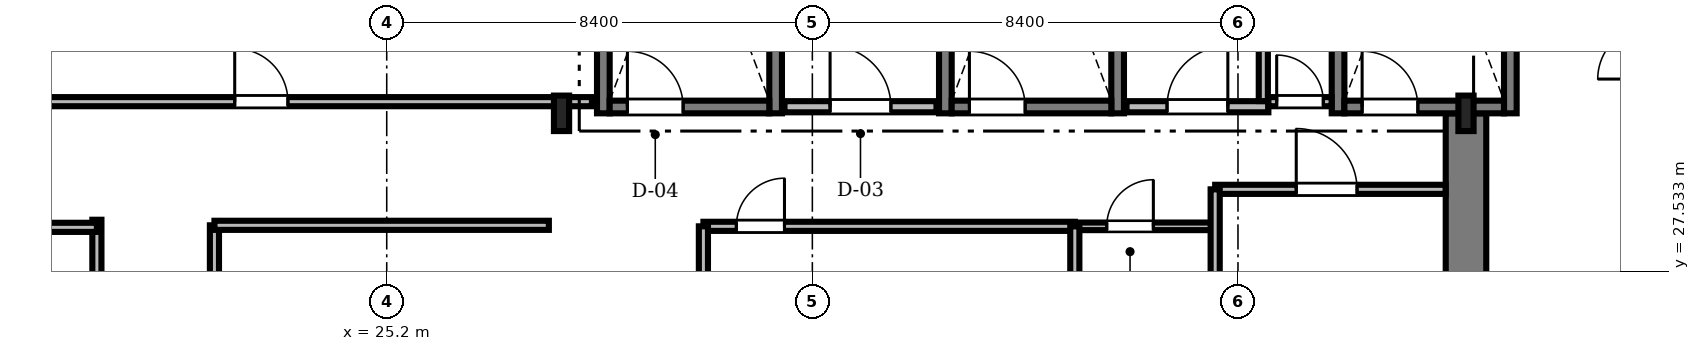
"""IFC4 building model, lengths in metres.
Left out: names, types, materials, properties, quantities, classifications, styles, units other than length and angle.
Written with IfcOpenShell. Run it as: python <this file> out.ifc"""

import sys

from ifc_helpers import new_model, si_unit, direction, frame, frame_2d, origin, origin_2d, place, context, subcontext, project, spatial, rectangle, i_section, extrude, source, transform, mapped, element, fill, save


model = new_model("IFC4")
c1 = context("Model", 3, precision=1e-05, world=origin(), true_north=direction((0.0, 1.0)))
c2 = subcontext(c1, "Body", "Model", "MODEL_VIEW")
j1 = project(units=[si_unit("LENGTHUNIT", "METRE"), si_unit("PLANEANGLEUNIT", "RADIAN")], contexts=[c1])
p1 = place(None, origin())
s1 = spatial("IfcSite", under=j1, at=p1, CompositionType="ELEMENT")
p2 = place(p1, origin())
s2 = spatial("IfcBuilding", under=s1, at=p2, CompositionType="ELEMENT")
p3 = place(p2, frame((0.0, 0.0, 199.8)))
s3 = spatial("IfcBuildingStorey", under=s2, at=p3, CompositionType="ELEMENT", Elevation=199.8)
m1 = source(origin(), c2, "Body", "SweptSolid", [
    extrude(rectangle(XDim=13.15, YDim=0.8, at=frame_2d((6.575, 0.0))), origin(), (0.0, 0.0, 1.0), 3.53),
])
p4 = place(p3, frame((46.5, 17.5, 0.0), z_axis=(0.0, 0.0, 1.0), x_axis=(0.0, 1.0, 0.0)))
e1 = element("IfcWall", 1, at=p4, inside=s3, PredefinedType="SHEAR", context=c2, shape_type="MappedRepresentation", body=[
    mapped(m1, transform((0.0, 0.0, 0.0), scale=1.0)),
])
m2 = source(origin(), c2, "Body", "SweptSolid", [
    extrude(i_section(OverallWidth=0.3, OverallDepth=0.7, WebThickness=0.017, FlangeThickness=0.032, FilletRadius=0.027, at=origin_2d()), origin(), (0.0, 0.0, 1.0), 3.53),
])
for number, where, z_axis, x_axis in (
    (2, (28.65, 30.65, 0.0), (0.0, 0.0, 1.0), (1.0, 0.0, 0.0)),
    (3, (46.5, 30.65, 0.0), (0.0, 0.0, 1.0), (1.0, 0.0, 0.0)),
):
    element("IfcColumn", number, at=place(p3, frame(where, z_axis=z_axis, x_axis=x_axis)), inside=s3, PredefinedType="COLUMN", context=c2, shape_type="MappedRepresentation", body=[
        mapped(m2, transform((0.0, 0.0, 0.0), scale=1.0)),
    ])
m3 = source(origin(), c2, "Body", "SweptSolid", [
    extrude(rectangle(XDim=9.25, YDim=0.25, at=frame_2d((4.625, 0.0))), origin(), (0.0, 0.0, 1.0), 3.55),
])
for number, where, z_axis, x_axis in (
    (4, (29.475, 30.65, 0.0), (0.0, 0.0, 1.0), (0.0, 1.0, 0.0)),
    (5, (32.875, 30.65, 0.0), (0.0, 0.0, 1.0), (0.0, 1.0, 0.0)),
):
    element("IfcWall", number, at=place(p3, frame(where, z_axis=z_axis, x_axis=x_axis)), inside=s3, PredefinedType="SOLIDWALL", context=c2, shape_type="MappedRepresentation", body=[
        mapped(m3, transform((0.0, 0.0, 0.0), scale=1.0)),
    ])
m4 = source(origin(), c2, "Body", "SweptSolid", [
    extrude(rectangle(XDim=3.15, YDim=0.25, at=frame_2d((1.575, 0.0))), origin(), (0.0, 0.0, 1.0), 3.55),
])
p5 = place(p3, frame((29.6, 30.775, 0.0), z_axis=(0.0, 0.0, 1.0), x_axis=(1.0, 0.0, 0.0)))
e6 = element("IfcWall", 6, at=p5, inside=s3, PredefinedType="SOLIDWALL", context=c2, shape_type="MappedRepresentation", body=[
    mapped(m4, transform((0.0, 0.0, 0.0), scale=1.0)),
])
m5 = source(origin(), c2, "Body", "SweptSolid", [
    extrude(rectangle(XDim=1.1, YDim=2.2, at=frame_2d((0.55, 1.1))), frame((0.0, 0.135, 0.0), z_axis=(0.0, -1.0, 0.0), x_axis=(1.0, 0.0, 0.0)), (0.0, 0.0, 1.0), 0.27),
])
p6 = place(p5, frame((0.35, 0.0, 0.0)))
e7 = element("IfcOpeningElement", 7, at=p6, cuts=e6, PredefinedType="OPENING", context=c2, shape_type="MappedRepresentation", body=[
    mapped(m5, transform((0.0, 0.0, 0.0), scale=1.0)),
])
for number, where, z_axis, x_axis in (
    (8, (36.225, 30.65, 0.0), (0.0, 0.0, 1.0), (0.0, 1.0, 0.0)),
    (9, (39.625, 30.65, 0.0), (0.0, 0.0, 1.0), (0.0, 1.0, 0.0)),
):
    element("IfcWall", number, at=place(p3, frame(where, z_axis=z_axis, x_axis=x_axis)), inside=s3, PredefinedType="SOLIDWALL", context=c2, shape_type="MappedRepresentation", body=[
        mapped(m3, transform((0.0, 0.0, 0.0), scale=1.0)),
    ])
p7 = place(p3, frame((36.35, 30.775, 0.0), z_axis=(0.0, 0.0, 1.0), x_axis=(1.0, 0.0, 0.0)))
e10 = element("IfcWall", 10, at=p7, inside=s3, PredefinedType="SOLIDWALL", context=c2, shape_type="MappedRepresentation", body=[
    mapped(m4, transform((0.0, 0.0, 0.0), scale=1.0)),
])
p8 = place(p7, frame((0.35, 0.0, 0.0)))
e11 = element("IfcOpeningElement", 11, at=p8, cuts=e10, PredefinedType="OPENING", context=c2, shape_type="MappedRepresentation", body=[
    mapped(m5, transform((0.0, 0.0, 0.0), scale=1.0)),
])
for number, where, z_axis, x_axis in (
    (12, (43.975, 30.65, 0.0), (0.0, 0.0, 1.0), (0.0, 1.0, 0.0)),
    (13, (47.375, 30.65, 0.0), (0.0, 0.0, 1.0), (0.0, 1.0, 0.0)),
):
    element("IfcWall", number, at=place(p3, frame(where, z_axis=z_axis, x_axis=x_axis)), inside=s3, PredefinedType="SOLIDWALL", context=c2, shape_type="MappedRepresentation", body=[
        mapped(m3, transform((0.0, 0.0, 0.0), scale=1.0)),
    ])
p9 = place(p3, frame((44.1, 30.775, 0.0), z_axis=(0.0, 0.0, 1.0), x_axis=(1.0, 0.0, 0.0)))
e14 = element("IfcWall", 14, at=p9, inside=s3, PredefinedType="SOLIDWALL", context=c2, shape_type="MappedRepresentation", body=[
    mapped(m4, transform((0.0, 0.0, 0.0), scale=1.0)),
])
p10 = place(p9, frame((0.35, 0.0, 0.0)))
e15 = element("IfcOpeningElement", 15, at=p10, cuts=e14, PredefinedType="OPENING", context=c2, shape_type="MappedRepresentation", body=[
    mapped(m5, transform((0.0, 0.0, 0.0), scale=1.0)),
])
m6 = source(origin(), c2, "Body", "SweptSolid", [
    extrude(rectangle(XDim=3.0, YDim=0.22, at=frame_2d((1.5, 0.0))), origin(), (0.0, 0.0, 1.0), 3.53),
])
p11 = place(p3, frame((33.05, 30.78, 0.0), z_axis=(0.0, 0.0, 1.0), x_axis=(1.0, 0.0, 0.0)))
e16 = element("IfcWall", 16, at=p11, inside=s3, PredefinedType="SOLIDWALL", context=c2, shape_type="MappedRepresentation", body=[
    mapped(m6, transform((0.0, 0.0, 0.0), scale=1.0)),
])
m7 = source(origin(), c2, "Body", "SweptSolid", [
    extrude(rectangle(XDim=1.2, YDim=2.2, at=frame_2d((0.6, 1.1))), frame((0.0, 0.12, 0.0), z_axis=(0.0, -1.0, 0.0), x_axis=(1.0, 0.0, 0.0)), (0.0, 0.0, 1.0), 0.24),
])
p12 = place(p11, frame((0.9, 0.0, 0.0)))
e17 = element("IfcOpeningElement", 17, at=p12, cuts=e16, PredefinedType="OPENING", context=c2, shape_type="MappedRepresentation", body=[
    mapped(m7, transform((0.0, 0.0, 0.0), scale=1.0)),
])
m8 = source(origin(), c2, "Body", "SweptSolid", [
    extrude(rectangle(XDim=2.8, YDim=0.22, at=frame_2d((1.4, 0.0))), origin(), (0.0, 0.0, 1.0), 3.53),
])
p13 = place(p3, frame((39.8, 30.78, 0.0), z_axis=(0.0, 0.0, 1.0), x_axis=(1.0, 0.0, 0.0)))
e18 = element("IfcWall", 18, at=p13, inside=s3, PredefinedType="SOLIDWALL", context=c2, shape_type="MappedRepresentation", body=[
    mapped(m8, transform((0.0, 0.0, 0.0), scale=1.0)),
])
p14 = place(p13, frame((0.8, 0.0, 0.0)))
e19 = element("IfcOpeningElement", 19, at=p14, cuts=e18, PredefinedType="OPENING", context=c2, shape_type="MappedRepresentation", body=[
    mapped(m7, transform((0.0, 0.0, 0.0), scale=1.0)),
])
m9 = source(origin(), c2, "Body", "SweptSolid", [
    extrude(rectangle(XDim=17.828, YDim=0.18, at=frame_2d((8.914, 0.0))), origin(), (0.0, 0.0, 1.0), 2.772),
])
p15 = place(p3, frame((11.422, 30.88, 0.0), z_axis=(0.0, 0.0, 1.0), x_axis=(1.0, 0.0, 0.0)))
e20 = element("IfcWall", 20, at=p15, inside=s3, PredefinedType="PARTITIONING", context=c2, shape_type="MappedRepresentation", body=[
    mapped(m9, transform((0.0, 0.0, 0.0), scale=1.0)),
])
m10 = source(origin(), c2, "Body", "SweptSolid", [
    extrude(rectangle(XDim=1.05, YDim=2.2, at=frame_2d((0.525, 1.1))), frame((0.0, 0.1, 0.0), z_axis=(0.0, -1.0, 0.0), x_axis=(1.0, 0.0, 0.0)), (0.0, 0.0, 1.0), 0.2),
])
p16 = place(p15, frame((10.778, 0.0, 0.0)))
e21 = element("IfcOpeningElement", 21, at=p16, cuts=e20, PredefinedType="OPENING", context=c2, shape_type="MappedRepresentation", body=[
    mapped(m10, transform((0.0, 0.0, 0.0), scale=1.0)),
])
m11 = source(origin(), c2, "Body", "SweptSolid", [
    extrude(rectangle(XDim=14.92, YDim=0.18, at=frame_2d((7.46, 0.0))), origin(), (0.0, 0.0, 1.0), 2.972),
])
p17 = place(p3, frame((19.48, 13.63, 0.0), z_axis=(0.0, 0.0, 1.0), x_axis=(0.0, 1.0, 0.0)))
e22 = element("IfcWall", 22, at=p17, inside=s3, PredefinedType="PARTITIONING", context=c2, shape_type="MappedRepresentation", body=[
    mapped(m11, transform((0.0, 0.0, 0.0), scale=1.0)),
])
p18 = place(p17, frame((1.942, 0.0, 0.0)))
e23 = element("IfcOpeningElement", 23, at=p18, cuts=e22, PredefinedType="OPENING", context=c2, shape_type="MappedRepresentation", body=[
    mapped(m10, transform((0.0, 0.0, 0.0), scale=1.0)),
])
m12 = source(origin(), c2, "Body", "SweptSolid", [
    extrude(rectangle(XDim=0.95, YDim=2.15, at=frame_2d((0.475, 1.075))), frame((0.0, 0.1, 0.0), z_axis=(0.0, -1.0, 0.0), x_axis=(1.0, 0.0, 0.0)), (0.0, 0.0, 1.0), 0.2),
])
p19 = place(p17, frame((8.09, 0.0, 0.0)))
e24 = element("IfcOpeningElement", 24, at=p19, cuts=e22, PredefinedType="OPENING", context=c2, shape_type="MappedRepresentation", body=[
    mapped(m12, transform((0.0, 0.0, 0.0), scale=1.0)),
])
p20 = place(p17, frame((11.788, 0.0, 0.0)))
e25 = element("IfcOpeningElement", 25, at=p20, cuts=e22, PredefinedType="OPENING", context=c2, shape_type="MappedRepresentation", body=[
    mapped(m10, transform((0.0, 0.0, 0.0), scale=1.0)),
])
m13 = source(origin(), c2, "Body", "SweptSolid", [
    extrude(rectangle(XDim=11.94, YDim=0.18, at=frame_2d((5.97, 0.0))), origin(), (0.0, 0.0, 1.0), 2.972),
])
p21 = place(p3, frame((21.8, 16.5, 0.0), z_axis=(0.0, 0.0, 1.0), x_axis=(0.0, 1.0, 0.0)))
e26 = element("IfcWall", 26, at=p21, inside=s3, PredefinedType="PARTITIONING", context=c2, shape_type="MappedRepresentation", body=[
    mapped(m13, transform((0.0, 0.0, 0.0), scale=1.0)),
])
p22 = place(p21, frame((4.5, 0.0, 0.0)))
e27 = element("IfcOpeningElement", 27, at=p22, cuts=e26, PredefinedType="OPENING", context=c2, shape_type="MappedRepresentation", body=[
    mapped(m10, transform((0.0, 0.0, 0.0), scale=1.0)),
])
m14 = source(origin(), c2, "Body", "SweptSolid", [
    extrude(rectangle(XDim=7.33, YDim=0.18, at=frame_2d((3.665, 0.0))), origin(), (0.0, 0.0, 1.0), 3.162),
])
p23 = place(p3, frame((31.45, 28.42, 0.0), z_axis=(0.0, 0.0, 1.0), x_axis=(1.0, 0.0, 0.0)))
e28 = element("IfcWall", 28, at=p23, inside=s3, PredefinedType="PARTITIONING", context=c2, shape_type="MappedRepresentation", body=[
    mapped(m14, transform((0.0, 0.0, 0.0), scale=1.0)),
])
p24 = place(p23, frame((0.65, 0.0, 0.0)))
e29 = element("IfcOpeningElement", 29, at=p24, cuts=e28, PredefinedType="OPENING", context=c2, shape_type="MappedRepresentation", body=[
    mapped(m12, transform((0.0, 0.0, 0.0), scale=1.0)),
])
m15 = source(origin(), c2, "Body", "SweptSolid", [
    extrude(rectangle(XDim=4.548, YDim=0.18, at=frame_2d((2.274, 0.0))), origin(), (0.0, 0.0, 1.0), 3.162),
])
p25 = place(p3, frame((41.55, 29.15, 0.0), z_axis=(0.0, 0.0, 1.0), x_axis=(1.0, 0.0, 0.0)))
e30 = element("IfcWall", 30, at=p25, inside=s3, PredefinedType="PARTITIONING", context=c2, shape_type="MappedRepresentation", body=[
    mapped(m15, transform((0.0, 0.0, 0.0), scale=1.0)),
])
m16 = source(origin(), c2, "Body", "SweptSolid", [
    extrude(rectangle(XDim=1.2, YDim=2.2, at=frame_2d((0.6, 1.1))), frame((0.0, 0.1, 0.0), z_axis=(0.0, -1.0, 0.0), x_axis=(1.0, 0.0, 0.0)), (0.0, 0.0, 1.0), 0.2),
])
p26 = place(p25, frame((1.6, 0.0, 0.0)))
e31 = element("IfcOpeningElement", 31, at=p26, cuts=e30, PredefinedType="OPENING", context=c2, shape_type="MappedRepresentation", body=[
    mapped(m16, transform((0.0, 0.0, 0.0), scale=1.0)),
])
m17 = source(origin(), c2, "Body", "SweptSolid", [
    extrude(rectangle(XDim=2.74, YDim=0.15, at=frame_2d((1.37, 0.0))), origin(), (0.0, 0.0, 1.0), 3.53),
])
p27 = place(p3, frame((38.78, 28.42, 0.0), z_axis=(0.0, 0.0, 1.0), x_axis=(1.0, 0.0, 0.0)))
e32 = element("IfcWall", 32, at=p27, inside=s3, PredefinedType="PARTITIONING", context=c2, shape_type="MappedRepresentation", body=[
    mapped(m17, transform((0.0, 0.0, 0.0), scale=1.0)),
])
m18 = source(origin(), c2, "Body", "SweptSolid", [
    extrude(rectangle(XDim=0.92, YDim=2.1, at=frame_2d((0.46, 1.05))), frame((0.0, 0.085, 0.0), z_axis=(0.0, -1.0, 0.0), x_axis=(1.0, 0.0, 0.0)), (0.0, 0.0, 1.0), 0.17),
])
p28 = place(p27, frame((0.63, 0.0, 0.0)))
e33 = element("IfcOpeningElement", 33, at=p28, cuts=e32, PredefinedType="OPENING", context=c2, shape_type="MappedRepresentation", body=[
    mapped(m18, transform((0.0, 0.0, 0.0), scale=1.0)),
])
m19 = source(origin(), c2, "Body", "SweptSolid", [
    extrude(rectangle(XDim=1.248, YDim=0.18, at=frame_2d((0.624, 0.0))), origin(), (0.0, 0.0, 1.0), 3.53),
])
p29 = place(p3, frame((42.6, 30.88, 0.0), z_axis=(0.0, 0.0, 1.0), x_axis=(1.0, 0.0, 0.0)))
e34 = element("IfcWall", 34, at=p29, inside=s3, PredefinedType="PARTITIONING", context=c2, shape_type="MappedRepresentation", body=[
    mapped(m19, transform((0.0, 0.0, 0.0), scale=1.0)),
])
m20 = source(origin(), c2, "Body", "SweptSolid", [
    extrude(rectangle(XDim=0.92, YDim=2.1, at=frame_2d((0.46, 1.05))), frame((0.0, 0.1, 0.0), z_axis=(0.0, -1.0, 0.0), x_axis=(1.0, 0.0, 0.0)), (0.0, 0.0, 1.0), 0.2),
])
p30 = place(p29, frame((0.164, 0.0, 0.0)))
e35 = element("IfcOpeningElement", 35, at=p30, cuts=e34, PredefinedType="OPENING", context=c2, shape_type="MappedRepresentation", body=[
    mapped(m20, transform((0.0, 0.0, 0.0), scale=1.0)),
])
m21 = source(origin(), c2, "Body", "SweptSolid", [
    extrude(rectangle(XDim=8.25, YDim=0.18, at=frame_2d((4.125, 0.0))), origin(), (0.0, 0.0, 1.0), 2.772),
])
p31 = place(p3, frame((11.23, 28.4, 0.0), z_axis=(0.0, 0.0, 1.0), x_axis=(1.0, 0.0, 0.0)))
e36 = element("IfcWall", 36, at=p31, inside=s3, PredefinedType="PARTITIONING", context=c2, shape_type="MappedRepresentation", body=[
    mapped(m21, transform((0.0, 0.0, 0.0), scale=1.0)),
])
m22 = source(origin(), c2, "Body", "SweptSolid", [
    extrude(rectangle(XDim=6.6, YDim=0.18, at=frame_2d((3.3, 0.0))), origin(), (0.0, 0.0, 1.0), 3.53),
])
p32 = place(p3, frame((21.8, 28.44, 0.0), z_axis=(0.0, 0.0, 1.0), x_axis=(1.0, 0.0, 0.0)))
e37 = element("IfcWall", 37, at=p32, inside=s3, PredefinedType="PARTITIONING", context=c2, shape_type="MappedRepresentation", body=[
    mapped(m22, transform((0.0, 0.0, 0.0), scale=1.0)),
])
m23 = source(origin(), c2, "Body", "SweptSolid", [
    extrude(rectangle(XDim=2.758, YDim=0.18, at=frame_2d((1.379, 0.0))), origin(), (0.0, 0.0, 1.0), 3.53),
])
p33 = place(p3, frame((42.5, 30.892, 0.0), z_axis=(0.0, 0.0, 1.0), x_axis=(0.0, 1.0, 0.0)))
e38 = element("IfcWall", 38, at=p33, inside=s3, PredefinedType="PARTITIONING", context=c2, shape_type="MappedRepresentation", body=[
    mapped(m23, transform((0.0, 0.0, 0.0), scale=1.0)),
])
m24 = source(origin(), c2, "Body", "SweptSolid", [
    extrude(rectangle(XDim=2.35, YDim=0.18, at=frame_2d((1.175, 0.0))), origin(), (0.0, 0.0, 1.0), 2.972),
])
p34 = place(p3, frame((41.55, 26.8, 0.0), z_axis=(0.0, 0.0, 1.0), x_axis=(0.0, 1.0, 0.0)))
e39 = element("IfcWall", 39, at=p34, inside=s3, PredefinedType="PARTITIONING", context=c2, shape_type="MappedRepresentation", body=[
    mapped(m24, transform((0.0, 0.0, 0.0), scale=1.0)),
])
m25 = source(origin(), c2, "Body", "SweptSolid", [
    extrude(rectangle(XDim=1.6, YDim=0.18, at=frame_2d((0.8, 0.0))), origin(), (0.0, 0.0, 1.0), 3.072),
])
for number, where, z_axis, x_axis in (
    (40, (31.45, 26.82, 0.0), (0.0, 0.0, 1.0), (0.0, 1.0, 0.0)),
    (41, (38.78, 26.82, 0.0), (0.0, 0.0, 1.0), (0.0, 1.0, 0.0)),
):
    element("IfcWall", number, at=place(p3, frame(where, z_axis=z_axis, x_axis=x_axis)), inside=s3, PredefinedType="PARTITIONING", context=c2, shape_type="MappedRepresentation", body=[
        mapped(m25, transform((0.0, 0.0, 0.0), scale=1.0)),
    ])
m26 = source(origin(), c2, "Body", "SweptSolid", [
    extrude(rectangle(XDim=1.1, YDim=2.2, at=frame_2d((0.55, 1.1))), frame((0.0, 0.025, 0.0), z_axis=(0.0, -1.0, 0.0), x_axis=(1.0, 0.0, 0.0)), (0.0, 0.0, 1.0), 0.05),
])
p35 = place(p6, origin())
e42 = element("IfcDoor", 42, at=p35, inside=s3, OperationType="SINGLE_SWING_LEFT", PredefinedType="DOOR", context=c2, shape_type="MappedRepresentation", body=[
    mapped(m26, transform((0.0, 0.0, 0.0), scale=1.0)),
])
fill(e7, e42)
p36 = place(p8, origin())
e43 = element("IfcDoor", 43, at=p36, inside=s3, OperationType="SINGLE_SWING_LEFT", PredefinedType="DOOR", context=c2, shape_type="MappedRepresentation", body=[
    mapped(m26, transform((0.0, 0.0, 0.0), scale=1.0)),
])
fill(e11, e43)
p37 = place(p10, origin())
e44 = element("IfcDoor", 44, at=p37, inside=s3, OperationType="SINGLE_SWING_LEFT", PredefinedType="DOOR", context=c2, shape_type="MappedRepresentation", body=[
    mapped(m26, transform((0.0, 0.0, 0.0), scale=1.0)),
])
fill(e15, e44)
m27 = source(origin(), c2, "Body", "SweptSolid", [
    extrude(rectangle(XDim=1.2, YDim=2.2, at=frame_2d((0.6, 1.1))), frame((0.0, 0.025, 0.0), z_axis=(0.0, -1.0, 0.0), x_axis=(1.0, 0.0, 0.0)), (0.0, 0.0, 1.0), 0.05),
])
p38 = place(p12, origin())
e45 = element("IfcDoor", 45, at=p38, inside=s3, OperationType="SINGLE_SWING_LEFT", PredefinedType="DOOR", context=c2, shape_type="MappedRepresentation", body=[
    mapped(m27, transform((0.0, 0.0, 0.0), scale=1.0)),
])
fill(e17, e45)
p39 = place(p14, origin())
e46 = element("IfcDoor", 46, at=p39, inside=s3, OperationType="SINGLE_SWING_RIGHT", PredefinedType="DOOR", context=c2, shape_type="MappedRepresentation", body=[
    mapped(m27, transform((0.0, 0.0, 0.0), scale=1.0)),
])
fill(e19, e46)
m28 = source(origin(), c2, "Body", "SweptSolid", [
    extrude(rectangle(XDim=1.05, YDim=2.2, at=frame_2d((0.525, 1.1))), frame((0.0, 0.025, 0.0), z_axis=(0.0, -1.0, 0.0), x_axis=(1.0, 0.0, 0.0)), (0.0, 0.0, 1.0), 0.05),
])
p40 = place(p16, origin())
e47 = element("IfcDoor", 47, at=p40, inside=s3, OperationType="SINGLE_SWING_LEFT", PredefinedType="DOOR", context=c2, shape_type="MappedRepresentation", body=[
    mapped(m28, transform((0.0, 0.0, 0.0), scale=1.0)),
])
fill(e21, e47)
m29 = source(origin(), c2, "Body", "SweptSolid", [
    extrude(rectangle(XDim=0.95, YDim=2.15, at=frame_2d((0.475, 1.075))), frame((0.0, 0.025, 0.0), z_axis=(0.0, -1.0, 0.0), x_axis=(1.0, 0.0, 0.0)), (0.0, 0.0, 1.0), 0.05),
])
p41 = place(p24, origin())
e48 = element("IfcDoor", 48, at=p41, inside=s3, OperationType="SINGLE_SWING_RIGHT", PredefinedType="DOOR", context=c2, shape_type="MappedRepresentation", body=[
    mapped(m29, transform((0.0, 0.0, 0.0), scale=1.0)),
])
fill(e29, e48)
p42 = place(p26, origin())
e49 = element("IfcDoor", 49, at=p42, inside=s3, OperationType="SINGLE_SWING_LEFT", PredefinedType="DOOR", context=c2, shape_type="MappedRepresentation", body=[
    mapped(m27, transform((0.0, 0.0, 0.0), scale=1.0)),
])
fill(e31, e49)
m30 = source(origin(), c2, "Body", "SweptSolid", [
    extrude(rectangle(XDim=0.92, YDim=2.1, at=frame_2d((0.46, 1.05))), frame((0.0, 0.025, 0.0), z_axis=(0.0, -1.0, 0.0), x_axis=(1.0, 0.0, 0.0)), (0.0, 0.0, 1.0), 0.05),
])
p43 = place(p28, origin())
e50 = element("IfcDoor", 50, at=p43, inside=s3, OperationType="SINGLE_SWING_RIGHT", PredefinedType="DOOR", context=c2, shape_type="MappedRepresentation", body=[
    mapped(m30, transform((0.0, 0.0, 0.0), scale=1.0)),
])
fill(e33, e50)
p44 = place(p30, origin())
e51 = element("IfcDoor", 51, at=p44, inside=s3, OperationType="SINGLE_SWING_LEFT", PredefinedType="DOOR", context=c2, shape_type="MappedRepresentation", body=[
    mapped(m30, transform((0.0, 0.0, 0.0), scale=1.0)),
])
fill(e35, e51)
save(model, sys.argv[1])
